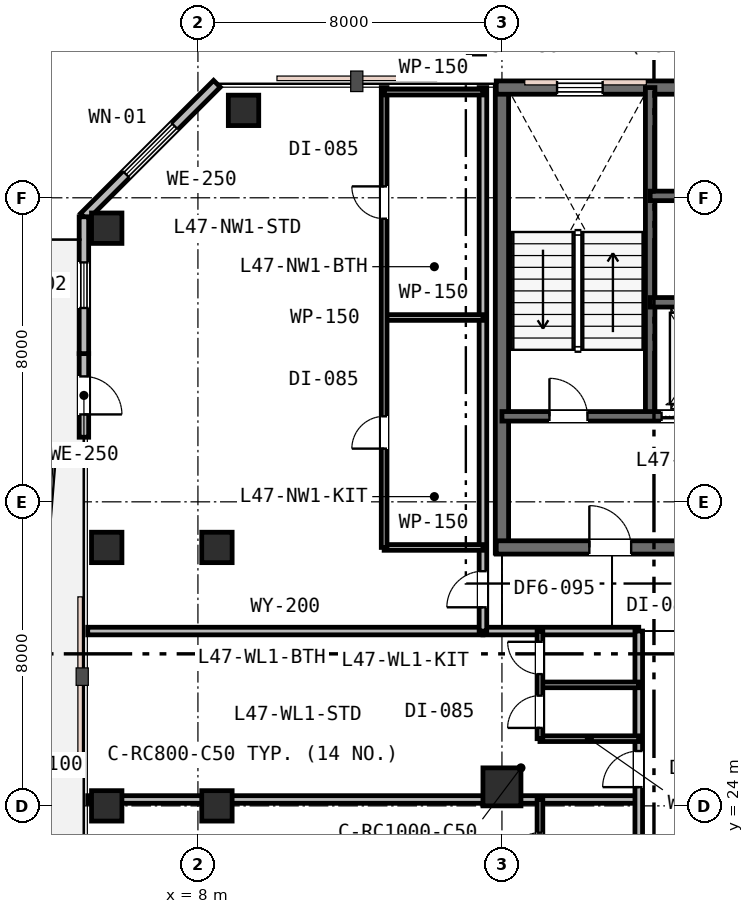
"""IFC4 building model, lengths in metres.
Left out: names, types, materials, properties, quantities, classifications, styles, units other than length and angle.
Written with IfcOpenShell. Run it as: python <this file> out.ifc"""

import sys

from ifc_helpers import new_model, si_unit, direction, frame, frame_2d, origin, origin_2d, place, context, subcontext, project, spatial, rectangle, extrude, element, fill, save


model = new_model("IFC4")
c1 = context("Model", 3, precision=1e-05, world=origin(), true_north=direction((0.0, 1.0)))
c2 = subcontext(c1, "Body", "Model", "MODEL_VIEW")
j1 = project(units=[si_unit("LENGTHUNIT", "METRE"), si_unit("PLANEANGLEUNIT", "RADIAN")], contexts=[c1])
p1 = place(None, origin())
s1 = spatial("IfcSite", under=j1, at=p1, CompositionType="ELEMENT")
p2 = place(p1, origin())
s2 = spatial("IfcBuilding", under=s1, at=p2, CompositionType="ELEMENT")
p3 = place(p2, frame((0.0, 0.0, 183.0)))
s3 = spatial("IfcBuildingStorey", under=s2, at=p3, CompositionType="ELEMENT", Elevation=183.0)
p4 = place(p3, frame((16.0, 30.65, 0.0), z_axis=(0.0, 0.0, 1.0), x_axis=(0.0, 1.0, 0.0)))
e1 = element("IfcWall", 1, at=p4, inside=s3, PredefinedType="SHEAR", context=c2, shape_type="SweptSolid", body=[
    extrude(rectangle(XDim=12.3, YDim=0.35, at=frame_2d((6.15, 0.0))), origin(), (0.0, 0.0, 1.0), 3.6),
])
p5 = place(p3, frame((15.85, 42.9, 0.0), z_axis=(0.0, 0.0, 1.0), x_axis=(1.0, 0.0, 0.0)))
e2 = element("IfcWall", 2, at=p5, inside=s3, PredefinedType="SHEAR", context=c2, shape_type="SweptSolid", body=[
    extrude(rectangle(XDim=24.3, YDim=0.35, at=frame_2d((12.15, 0.0))), origin(), (0.0, 0.0, 1.0), 3.6),
])
p6 = place(p5, frame((1.6, 0.0, 0.95)))
e3 = element("IfcOpeningElement", 3, at=p6, cuts=e2, PredefinedType="OPENING", context=c2, shape_type="SweptSolid", body=[
    extrude(rectangle(XDim=1.2, YDim=1.6, at=frame_2d((0.6, 0.8))), frame((0.0, 0.185, 0.0), z_axis=(0.0, -1.0, 0.0), x_axis=(1.0, 0.0, 0.0)), (0.0, 0.0, 1.0), 0.37),
])
p7 = place(p5, frame((16.5, 0.0, 0.95)))
e4 = element("IfcOpeningElement", 4, at=p7, cuts=e2, PredefinedType="OPENING", context=c2, shape_type="SweptSolid", body=[
    extrude(rectangle(XDim=1.2, YDim=1.6, at=frame_2d((0.6, 0.8))), frame((0.0, 0.185, 0.0), z_axis=(0.0, -1.0, 0.0), x_axis=(1.0, 0.0, 0.0)), (0.0, 0.0, 1.0), 0.37),
])
p8 = place(p5, frame((21.6, 0.0, 0.95)))
e5 = element("IfcOpeningElement", 5, at=p8, cuts=e2, PredefinedType="OPENING", context=c2, shape_type="SweptSolid", body=[
    extrude(rectangle(XDim=1.2, YDim=1.6, at=frame_2d((0.6, 0.8))), frame((0.0, 0.185, 0.0), z_axis=(0.0, -1.0, 0.0), x_axis=(1.0, 0.0, 0.0)), (0.0, 0.0, 1.0), 0.37),
])
p9 = place(p3, frame((15.85, 30.8, 0.0), z_axis=(0.0, 0.0, 1.0), x_axis=(1.0, 0.0, 0.0)))
e6 = element("IfcWall", 6, at=p9, inside=s3, PredefinedType="SHEAR", context=c2, shape_type="SweptSolid", body=[
    extrude(rectangle(XDim=11.2, YDim=0.35, at=frame_2d((5.6, 0.0))), origin(), (0.0, 0.0, 1.0), 3.6),
])
p10 = place(p9, frame((2.45, 0.0, 0.0)))
e7 = element("IfcOpeningElement", 7, at=p10, cuts=e6, PredefinedType="OPENING", context=c2, shape_type="SweptSolid", body=[
    extrude(rectangle(XDim=1.1, YDim=2.15, at=frame_2d((0.55, 1.075))), frame((0.0, 0.185, 0.0), z_axis=(0.0, -1.0, 0.0), x_axis=(1.0, 0.0, 0.0)), (0.0, 0.0, 1.0), 0.37),
])
p11 = place(p3, frame((19.9, 34.25, 0.0), z_axis=(0.0, 0.0, 1.0), x_axis=(0.0, 1.0, 0.0)))
e8 = element("IfcWall", 8, at=p11, inside=s3, PredefinedType="SHEAR", context=c2, shape_type="SweptSolid", body=[
    extrude(rectangle(XDim=8.65, YDim=0.25, at=frame_2d((4.325, 0.0))), origin(), (0.0, 0.0, 1.0), 3.6),
])
p12 = place(p3, frame((16.0, 34.25, 0.0), z_axis=(0.0, 0.0, 1.0), x_axis=(1.0, 0.0, 0.0)))
e9 = element("IfcWall", 9, at=p12, inside=s3, PredefinedType="SHEAR", context=c2, shape_type="SweptSolid", body=[
    extrude(rectangle(XDim=6.05, YDim=0.25, at=frame_2d((3.025, 0.0))), origin(), (0.0, 0.0, 1.0), 3.6),
])
p13 = place(p12, frame((1.25, 0.0, 0.0)))
e10 = element("IfcOpeningElement", 10, at=p13, cuts=e9, PredefinedType="OPENING", context=c2, shape_type="SweptSolid", body=[
    extrude(rectangle(XDim=1.0, YDim=2.15, at=frame_2d((0.5, 1.075))), frame((0.0, 0.135, 0.0), z_axis=(0.0, -1.0, 0.0), x_axis=(1.0, 0.0, 0.0)), (0.0, 0.0, 1.0), 0.27),
])
p14 = place(p12, frame((4.2, 0.0, 0.0)))
e11 = element("IfcOpeningElement", 11, at=p14, cuts=e9, PredefinedType="OPENING", context=c2, shape_type="SweptSolid", body=[
    extrude(rectangle(XDim=1.1, YDim=2.15, at=frame_2d((0.55, 1.075))), frame((0.0, 0.135, 0.0), z_axis=(0.0, -1.0, 0.0), x_axis=(1.0, 0.0, 0.0)), (0.0, 0.0, 1.0), 0.27),
])
p15 = place(p3, frame((19.9, 37.25, 0.0), z_axis=(0.0, 0.0, 1.0), x_axis=(1.0, 0.0, 0.0)))
e12 = element("IfcWall", 12, at=p15, inside=s3, PredefinedType="SHEAR", context=c2, shape_type="SweptSolid", body=[
    extrude(rectangle(XDim=16.2, YDim=0.25, at=frame_2d((8.1, 0.0))), origin(), (0.0, 0.0, 1.0), 3.6),
])
p16 = place(p15, frame((12.55, 0.0, 0.0)))
e13 = element("IfcOpeningElement", 13, at=p16, cuts=e12, PredefinedType="OPENING", context=c2, shape_type="SweptSolid", body=[
    extrude(rectangle(XDim=0.9, YDim=2.15, at=frame_2d((0.45, 1.075))), frame((0.0, 0.135, 0.0), z_axis=(0.0, -1.0, 0.0), x_axis=(1.0, 0.0, 0.0)), (0.0, 0.0, 1.0), 0.27),
])
p17 = place(p15, frame((2.5, 0.0, 0.0)))
e14 = element("IfcOpeningElement", 14, at=p17, cuts=e12, PredefinedType="OPENING", context=c2, shape_type="SweptSolid", body=[
    extrude(rectangle(XDim=1.05, YDim=2.15, at=frame_2d((0.525, 1.075))), frame((0.0, 0.135, 0.0), z_axis=(0.0, -1.0, 0.0), x_axis=(1.0, 0.0, 0.0)), (0.0, 0.0, 1.0), 0.27),
])
p18 = place(p15, frame((4.4, 0.0, 0.0)))
e15 = element("IfcOpeningElement", 15, at=p18, cuts=e12, PredefinedType="OPENING", context=c2, shape_type="SweptSolid", body=[
    extrude(rectangle(XDim=1.05, YDim=2.15, at=frame_2d((0.525, 1.075))), frame((0.0, 0.135, 0.0), z_axis=(0.0, -1.0, 0.0), x_axis=(1.0, 0.0, 0.0)), (0.0, 0.0, 1.0), 0.27),
])
p19 = place(p15, frame((6.3, 0.0, 0.0)))
e16 = element("IfcOpeningElement", 16, at=p19, cuts=e12, PredefinedType="OPENING", context=c2, shape_type="SweptSolid", body=[
    extrude(rectangle(XDim=1.05, YDim=2.15, at=frame_2d((0.525, 1.075))), frame((0.0, 0.135, 0.0), z_axis=(0.0, -1.0, 0.0), x_axis=(1.0, 0.0, 0.0)), (0.0, 0.0, 1.0), 0.27),
])
p20 = place(p3, frame((19.9, 40.05, 0.0), z_axis=(0.0, 0.0, 1.0), x_axis=(1.0, 0.0, 0.0)))
e17 = element("IfcWall", 17, at=p20, inside=s3, PredefinedType="SHEAR", context=c2, shape_type="SweptSolid", body=[
    extrude(rectangle(XDim=12.05, YDim=0.25, at=frame_2d((6.025, 0.0))), origin(), (0.0, 0.0, 1.0), 3.6),
])
p21 = place(p3, frame((8.5, 24.0, 0.0), z_axis=(0.0, 0.0, 1.0), x_axis=(1.0, 0.0, 0.0)))
e18 = element("IfcColumn", 18, at=p21, inside=s3, PredefinedType="COLUMN", context=c2, shape_type="SweptSolid", body=[
    extrude(rectangle(XDim=0.8, YDim=0.8, at=origin_2d()), origin(), (0.0, 0.0, 1.0), 3.6),
])
p22 = place(p3, frame((16.0, 24.5, 0.0), z_axis=(0.0, 0.0, 1.0), x_axis=(1.0, 0.0, 0.0)))
e19 = element("IfcColumn", 19, at=p22, inside=s3, PredefinedType="COLUMN", context=c2, shape_type="SweptSolid", body=[
    extrude(rectangle(XDim=1.0, YDim=1.0, at=origin_2d()), origin(), (0.0, 0.0, 1.0), 3.6),
])
for number, where, z_axis, x_axis in (
    (20, (5.6, 24.0, 0.0), (0.0, 0.0, 1.0), (1.0, 0.0, 0.0)),
    (21, (5.6, 30.8, 0.0), (0.0, 0.0, 1.0), (1.0, 0.0, 0.0)),
    (22, (5.6, 39.2, 0.0), (0.0, 0.0, 1.0), (1.0, 0.0, 0.0)),
    (23, (8.5, 30.8, 0.0), (0.0, 0.0, 1.0), (1.0, 0.0, 0.0)),
    (24, (9.2, 42.3, 0.0), (0.0, 0.0, 1.0), (1.0, 0.0, 0.0)),
):
    element("IfcColumn", number, at=place(p3, frame(where, z_axis=z_axis, x_axis=x_axis)), inside=s3, PredefinedType="COLUMN", context=c2, shape_type="SweptSolid", body=[
        extrude(rectangle(XDim=0.8, YDim=0.8, at=origin_2d()), origin(), (0.0, 0.0, 1.0), 3.6),
    ])
p23 = place(p3, frame((8.5, 43.0, 0.0), z_axis=(0.0, 0.0, 1.0), x_axis=(-0.707106781187, -0.707106781187, 0.0)))
e25 = element("IfcWall", 25, at=p23, inside=s3, PredefinedType="STANDARD", context=c2, shape_type="SweptSolid", body=[
    extrude(rectangle(XDim=4.95, YDim=0.25, at=frame_2d((2.475, 0.0))), origin(), (0.0, 0.0, 1.0), 3.33),
])
p24 = place(p23, frame((1.575, 0.0, 0.75)))
e26 = element("IfcOpeningElement", 26, at=p24, cuts=e25, PredefinedType="OPENING", context=c2, shape_type="SweptSolid", body=[
    extrude(rectangle(XDim=1.8, YDim=1.85, at=frame_2d((0.9, 0.925))), frame((0.0, 0.135, 0.0), z_axis=(0.0, -1.0, 0.0), x_axis=(1.0, 0.0, 0.0)), (0.0, 0.0, 1.0), 0.27),
])
p25 = place(p3, frame((5.0, 35.9, 0.0), z_axis=(0.0, 0.0, 1.0), x_axis=(0.0, -1.0, 0.0)))
e27 = element("IfcWall", 27, at=p25, inside=s3, PredefinedType="STANDARD", context=c2, shape_type="SweptSolid", body=[
    extrude(rectangle(XDim=2.2, YDim=0.25, at=frame_2d((1.1, 0.0))), origin(), (0.0, 0.0, 1.0), 3.33),
])
p26 = place(p25, frame((0.6, 0.0, 0.0)))
e28 = element("IfcOpeningElement", 28, at=p26, cuts=e27, PredefinedType="OPENING", context=c2, shape_type="SweptSolid", body=[
    extrude(rectangle(XDim=1.0, YDim=2.15, at=frame_2d((0.5, 1.075))), frame((0.0, 0.135, 0.0), z_axis=(0.0, -1.0, 0.0), x_axis=(1.0, 0.0, 0.0)), (0.0, 0.0, 1.0), 0.27),
])
p27 = place(p3, frame((5.0, 39.5, 0.0), z_axis=(0.0, 0.0, 1.0), x_axis=(0.0, -1.0, 0.0)))
e29 = element("IfcWall", 29, at=p27, inside=s3, PredefinedType="STANDARD", context=c2, shape_type="SweptSolid", body=[
    extrude(rectangle(XDim=3.6, YDim=0.25, at=frame_2d((1.8, 0.0))), origin(), (0.0, 0.0, 1.0), 3.33),
])
p28 = place(p27, frame((1.2, 0.0, 0.85)))
e30 = element("IfcOpeningElement", 30, at=p28, cuts=e29, PredefinedType="OPENING", context=c2, shape_type="SweptSolid", body=[
    extrude(rectangle(XDim=1.2, YDim=1.6, at=frame_2d((0.6, 0.8))), frame((0.0, 0.135, 0.0), z_axis=(0.0, -1.0, 0.0), x_axis=(1.0, 0.0, 0.0)), (0.0, 0.0, 1.0), 0.27),
])
p29 = place(p3, frame((5.1, 28.6, 0.0), z_axis=(0.0, 0.0, 1.0), x_axis=(1.0, 0.0, 0.0)))
e31 = element("IfcWall", 31, at=p29, inside=s3, PredefinedType="PARTITIONING", context=c2, shape_type="SweptSolid", body=[
    extrude(rectangle(XDim=10.4, YDim=0.2, at=frame_2d((5.2, 0.0))), origin(), (0.0, 0.0, 1.0), 2.92),
])
p30 = place(p3, frame((15.5, 28.6, 0.0), z_axis=(0.0, 0.0, 1.0), x_axis=(1.0, 0.0, 0.0)))
e32 = element("IfcWall", 32, at=p30, inside=s3, PredefinedType="PARTITIONING", context=c2, shape_type="SweptSolid", body=[
    extrude(rectangle(XDim=4.1, YDim=0.2, at=frame_2d((2.05, 0.0))), origin(), (0.0, 0.0, 1.0), 2.92),
])
p31 = place(p3, frame((15.5, 28.6, 0.0), z_axis=(0.0, 0.0, 1.0), x_axis=(0.0, 1.0, 0.0)))
e33 = element("IfcWall", 33, at=p31, inside=s3, PredefinedType="PARTITIONING", context=c2, shape_type="SweptSolid", body=[
    extrude(rectangle(XDim=14.3, YDim=0.2, at=frame_2d((7.15, 0.0))), origin(), (0.0, 0.0, 1.0), 2.92),
])
p32 = place(p31, frame((0.625, 0.0, 0.0)))
e34 = element("IfcOpeningElement", 34, at=p32, cuts=e33, PredefinedType="OPENING", context=c2, shape_type="SweptSolid", body=[
    extrude(rectangle(XDim=0.95, YDim=2.15, at=frame_2d((0.475, 1.075))), frame((0.0, 0.11, 0.0), z_axis=(0.0, -1.0, 0.0), x_axis=(1.0, 0.0, 0.0)), (0.0, 0.0, 1.0), 0.22),
])
p33 = place(p3, frame((12.9, 30.8, 0.0), z_axis=(0.0, 0.0, 1.0), x_axis=(1.0, 0.0, 0.0)))
e35 = element("IfcWall", 35, at=p33, inside=s3, PredefinedType="PARTITIONING", context=c2, shape_type="SweptSolid", body=[
    extrude(rectangle(XDim=2.6, YDim=0.15, at=frame_2d((1.3, 0.0))), origin(), (0.0, 0.0, 1.0), 2.92),
])
p34 = place(p3, frame((12.9, 36.85, 0.0), z_axis=(0.0, 0.0, 1.0), x_axis=(1.0, 0.0, 0.0)))
e36 = element("IfcWall", 36, at=p34, inside=s3, PredefinedType="PARTITIONING", context=c2, shape_type="SweptSolid", body=[
    extrude(rectangle(XDim=2.6, YDim=0.15, at=frame_2d((1.3, 0.0))), origin(), (0.0, 0.0, 1.0), 3.33),
])
p35 = place(p3, frame((12.9, 30.8, 0.0), z_axis=(0.0, 0.0, 1.0), x_axis=(0.0, 1.0, 0.0)))
e37 = element("IfcWall", 37, at=p35, inside=s3, PredefinedType="PARTITIONING", context=c2, shape_type="SweptSolid", body=[
    extrude(rectangle(XDim=12.1, YDim=0.15, at=frame_2d((6.05, 0.0))), origin(), (0.0, 0.0, 1.0), 2.92),
])
p36 = place(p35, frame((2.6, 0.0, 0.0)))
e38 = element("IfcOpeningElement", 38, at=p36, cuts=e37, PredefinedType="OPENING", context=c2, shape_type="SweptSolid", body=[
    extrude(rectangle(XDim=0.85, YDim=2.15, at=frame_2d((0.425, 1.075))), frame((0.0, 0.085, 0.0), z_axis=(0.0, -1.0, 0.0), x_axis=(1.0, 0.0, 0.0)), (0.0, 0.0, 1.0), 0.17),
])
p37 = place(p35, frame((8.65, 0.0, 0.0)))
e39 = element("IfcOpeningElement", 39, at=p37, cuts=e37, PredefinedType="OPENING", context=c2, shape_type="SweptSolid", body=[
    extrude(rectangle(XDim=0.85, YDim=2.15, at=frame_2d((0.425, 1.075))), frame((0.0, 0.085, 0.0), z_axis=(0.0, -1.0, 0.0), x_axis=(1.0, 0.0, 0.0)), (0.0, 0.0, 1.0), 0.17),
])
p38 = place(p3, frame((12.9, 42.78, 0.0), z_axis=(0.0, 0.0, 1.0), x_axis=(1.0, 0.0, 0.0)))
e40 = element("IfcWall", 40, at=p38, inside=s3, PredefinedType="PARTITIONING", context=c2, shape_type="SweptSolid", body=[
    extrude(rectangle(XDim=2.6, YDim=0.15, at=frame_2d((1.3, 0.0))), origin(), (0.0, 0.0, 1.0), 3.33),
])
p39 = place(p3, frame((5.1, 24.168, 0.0), z_axis=(0.0, 0.0, 1.0), x_axis=(1.0, 0.0, 0.0)))
e41 = element("IfcWall", 41, at=p39, inside=s3, PredefinedType="PARTITIONING", context=c2, shape_type="SweptSolid", body=[
    extrude(rectangle(XDim=14.5, YDim=0.2, at=frame_2d((7.25, 0.0))), origin(), (0.0, 0.0, 1.0), 2.92),
])
p40 = place(p3, frame((19.6, 17.0, 0.0), z_axis=(0.0, 0.0, 1.0), x_axis=(0.0, 1.0, 0.0)))
e42 = element("IfcWall", 42, at=p40, inside=s3, PredefinedType="PARTITIONING", context=c2, shape_type="SweptSolid", body=[
    extrude(rectangle(XDim=11.6, YDim=0.2, at=frame_2d((5.8, 0.0))), origin(), (0.0, 0.0, 1.0), 2.92),
])
p41 = place(p40, frame((7.493, 0.0, 0.0)))
e43 = element("IfcOpeningElement", 43, at=p41, cuts=e42, PredefinedType="OPENING", context=c2, shape_type="SweptSolid", body=[
    extrude(rectangle(XDim=0.95, YDim=2.15, at=frame_2d((0.475, 1.075))), frame((0.0, 0.11, 0.0), z_axis=(0.0, -1.0, 0.0), x_axis=(1.0, 0.0, 0.0)), (0.0, 0.0, 1.0), 0.22),
])
p42 = place(p40, frame((0.909, 0.0, 0.0)))
e44 = element("IfcOpeningElement", 44, at=p42, cuts=e42, PredefinedType="OPENING", context=c2, shape_type="SweptSolid", body=[
    extrude(rectangle(XDim=0.95, YDim=2.15, at=frame_2d((0.475, 1.075))), frame((0.0, 0.11, 0.0), z_axis=(0.0, -1.0, 0.0), x_axis=(1.0, 0.0, 0.0)), (0.0, 0.0, 1.0), 0.22),
])
for number, where, z_axis, x_axis in (
    (45, (17.0, 25.768, 0.0), (0.0, 0.0, 1.0), (1.0, 0.0, 0.0)),
    (46, (17.0, 27.184, 0.0), (0.0, 0.0, 1.0), (1.0, 0.0, 0.0)),
):
    element("IfcWall", number, at=place(p3, frame(where, z_axis=z_axis, x_axis=x_axis)), inside=s3, PredefinedType="PARTITIONING", context=c2, shape_type="SweptSolid", body=[
        extrude(rectangle(XDim=2.6, YDim=0.15, at=frame_2d((1.3, 0.0))), origin(), (0.0, 0.0, 1.0), 3.07),
    ])
p43 = place(p3, frame((17.0, 25.768, 0.0), z_axis=(0.0, 0.0, 1.0), x_axis=(0.0, 1.0, 0.0)))
e47 = element("IfcWall", 47, at=p43, inside=s3, PredefinedType="PARTITIONING", context=c2, shape_type="SweptSolid", body=[
    extrude(rectangle(XDim=2.832, YDim=0.15, at=frame_2d((1.416, 0.0))), origin(), (0.0, 0.0, 1.0), 3.33),
])
p44 = place(p43, frame((0.283, 0.0, 0.0)))
e48 = element("IfcOpeningElement", 48, at=p44, cuts=e47, PredefinedType="OPENING", context=c2, shape_type="SweptSolid", body=[
    extrude(rectangle(XDim=0.85, YDim=2.15, at=frame_2d((0.425, 1.075))), frame((0.0, 0.085, 0.0), z_axis=(0.0, -1.0, 0.0), x_axis=(1.0, 0.0, 0.0)), (0.0, 0.0, 1.0), 0.17),
])
p45 = place(p43, frame((1.699, 0.0, 0.0)))
e49 = element("IfcOpeningElement", 49, at=p45, cuts=e47, PredefinedType="OPENING", context=c2, shape_type="SweptSolid", body=[
    extrude(rectangle(XDim=0.85, YDim=2.15, at=frame_2d((0.425, 1.075))), frame((0.0, 0.085, 0.0), z_axis=(0.0, -1.0, 0.0), x_axis=(1.0, 0.0, 0.0)), (0.0, 0.0, 1.0), 0.17),
])
p46 = place(p3, frame((17.0, 19.768, 0.0), z_axis=(0.0, 0.0, 1.0), x_axis=(0.0, 1.0, 0.0)))
e50 = element("IfcWall", 50, at=p46, inside=s3, PredefinedType="PARTITIONING", context=c2, shape_type="SweptSolid", body=[
    extrude(rectangle(XDim=4.4, YDim=0.15, at=frame_2d((2.2, 0.0))), origin(), (0.0, 0.0, 1.0), 2.92),
])
p47 = place(p46, frame((0.675, 0.0, 0.0)))
e51 = element("IfcOpeningElement", 51, at=p47, cuts=e50, PredefinedType="OPENING", context=c2, shape_type="SweptSolid", body=[
    extrude(rectangle(XDim=0.85, YDim=2.15, at=frame_2d((0.425, 1.075))), frame((0.0, 0.085, 0.0), z_axis=(0.0, -1.0, 0.0), x_axis=(1.0, 0.0, 0.0)), (0.0, 0.0, 1.0), 0.17),
])
p48 = place(p46, frame((2.677, 0.0, 0.0)))
e52 = element("IfcOpeningElement", 52, at=p48, cuts=e50, PredefinedType="OPENING", context=c2, shape_type="SweptSolid", body=[
    extrude(rectangle(XDim=0.85, YDim=2.15, at=frame_2d((0.425, 1.075))), frame((0.0, 0.085, 0.0), z_axis=(0.0, -1.0, 0.0), x_axis=(1.0, 0.0, 0.0)), (0.0, 0.0, 1.0), 0.17),
])
p49 = place(p6, origin())
e53 = element("IfcWindow", 53, at=p49, inside=s3, PartitioningType="SINGLE_PANEL", PredefinedType="WINDOW", context=c2, shape_type="SweptSolid", body=[
    extrude(rectangle(XDim=1.2, YDim=1.6, at=frame_2d((0.6, 0.8))), frame((0.0, 0.03, 0.0), z_axis=(0.0, -1.0, 0.0), x_axis=(1.0, 0.0, 0.0)), (0.0, 0.0, 1.0), 0.06),
])
fill(e3, e53)
p50 = place(p24, origin())
e54 = element("IfcWindow", 54, at=p50, inside=s3, PartitioningType="SINGLE_PANEL", PredefinedType="WINDOW", context=c2, shape_type="SweptSolid", body=[
    extrude(rectangle(XDim=1.8, YDim=1.85, at=frame_2d((0.9, 0.925))), frame((0.0, 0.03, 0.0), z_axis=(0.0, -1.0, 0.0), x_axis=(1.0, 0.0, 0.0)), (0.0, 0.0, 1.0), 0.06),
])
fill(e26, e54)
p51 = place(p26, origin())
e55 = element("IfcDoor", 55, at=p51, inside=s3, OperationType="SINGLE_SWING_RIGHT", PredefinedType="DOOR", context=c2, shape_type="SweptSolid", body=[
    extrude(rectangle(XDim=1.0, YDim=2.15, at=frame_2d((0.5, 1.075))), frame((0.0, 0.025, 0.0), z_axis=(0.0, -1.0, 0.0), x_axis=(1.0, 0.0, 0.0)), (0.0, 0.0, 1.0), 0.05),
])
fill(e28, e55)
p52 = place(p28, origin())
e56 = element("IfcWindow", 56, at=p52, inside=s3, PartitioningType="SINGLE_PANEL", PredefinedType="WINDOW", context=c2, shape_type="SweptSolid", body=[
    extrude(rectangle(XDim=1.2, YDim=1.6, at=frame_2d((0.6, 0.8))), frame((0.0, 0.03, 0.0), z_axis=(0.0, -1.0, 0.0), x_axis=(1.0, 0.0, 0.0)), (0.0, 0.0, 1.0), 0.06),
])
fill(e30, e56)
p53 = place(p13, origin())
e57 = element("IfcDoor", 57, at=p53, inside=s3, OperationType="SINGLE_SWING_LEFT", PredefinedType="DOOR", context=c2, shape_type="SweptSolid", body=[
    extrude(rectangle(XDim=1.0, YDim=2.15, at=frame_2d((0.5, 1.075))), frame((0.0, 0.025, 0.0), z_axis=(0.0, -1.0, 0.0), x_axis=(1.0, 0.0, 0.0)), (0.0, 0.0, 1.0), 0.05),
])
fill(e10, e57)
p54 = place(p10, origin())
e58 = element("IfcDoor", 58, at=p54, inside=s3, OperationType="SINGLE_SWING_LEFT", PredefinedType="DOOR", context=c2, shape_type="SweptSolid", body=[
    extrude(rectangle(XDim=1.1, YDim=2.15, at=frame_2d((0.55, 1.075))), frame((0.0, 0.025, 0.0), z_axis=(0.0, -1.0, 0.0), x_axis=(1.0, 0.0, 0.0)), (0.0, 0.0, 1.0), 0.05),
])
fill(e7, e58)
p55 = place(p32, origin())
e59 = element("IfcDoor", 59, at=p55, inside=s3, OperationType="SINGLE_SWING_LEFT", PredefinedType="DOOR", context=c2, shape_type="SweptSolid", body=[
    extrude(rectangle(XDim=0.95, YDim=2.15, at=frame_2d((0.475, 1.075))), frame((0.0, 0.025, 0.0), z_axis=(0.0, -1.0, 0.0), x_axis=(1.0, 0.0, 0.0)), (0.0, 0.0, 1.0), 0.05),
])
fill(e34, e59)
p56 = place(p36, origin())
e60 = element("IfcDoor", 60, at=p56, inside=s3, OperationType="SINGLE_SWING_LEFT", PredefinedType="DOOR", context=c2, shape_type="SweptSolid", body=[
    extrude(rectangle(XDim=0.85, YDim=2.15, at=frame_2d((0.425, 1.075))), frame((0.0, 0.025, 0.0), z_axis=(0.0, -1.0, 0.0), x_axis=(1.0, 0.0, 0.0)), (0.0, 0.0, 1.0), 0.05),
])
fill(e38, e60)
p57 = place(p37, origin())
e61 = element("IfcDoor", 61, at=p57, inside=s3, OperationType="SINGLE_SWING_RIGHT", PredefinedType="DOOR", context=c2, shape_type="SweptSolid", body=[
    extrude(rectangle(XDim=0.85, YDim=2.15, at=frame_2d((0.425, 1.075))), frame((0.0, 0.025, 0.0), z_axis=(0.0, -1.0, 0.0), x_axis=(1.0, 0.0, 0.0)), (0.0, 0.0, 1.0), 0.05),
])
fill(e39, e61)
p58 = place(p41, origin())
e62 = element("IfcDoor", 62, at=p58, inside=s3, OperationType="SINGLE_SWING_LEFT", PredefinedType="DOOR", context=c2, shape_type="SweptSolid", body=[
    extrude(rectangle(XDim=0.95, YDim=2.15, at=frame_2d((0.475, 1.075))), frame((0.0, 0.025, 0.0), z_axis=(0.0, -1.0, 0.0), x_axis=(1.0, 0.0, 0.0)), (0.0, 0.0, 1.0), 0.05),
])
fill(e43, e62)
p59 = place(p44, origin())
e63 = element("IfcDoor", 63, at=p59, inside=s3, OperationType="SINGLE_SWING_LEFT", PredefinedType="DOOR", context=c2, shape_type="SweptSolid", body=[
    extrude(rectangle(XDim=0.85, YDim=2.15, at=frame_2d((0.425, 1.075))), frame((0.0, 0.025, 0.0), z_axis=(0.0, -1.0, 0.0), x_axis=(1.0, 0.0, 0.0)), (0.0, 0.0, 1.0), 0.05),
])
fill(e48, e63)
p60 = place(p45, origin())
e64 = element("IfcDoor", 64, at=p60, inside=s3, OperationType="SINGLE_SWING_RIGHT", PredefinedType="DOOR", context=c2, shape_type="SweptSolid", body=[
    extrude(rectangle(XDim=0.85, YDim=2.15, at=frame_2d((0.425, 1.075))), frame((0.0, 0.025, 0.0), z_axis=(0.0, -1.0, 0.0), x_axis=(1.0, 0.0, 0.0)), (0.0, 0.0, 1.0), 0.05),
])
fill(e49, e64)
p61 = place(p48, origin())
e65 = element("IfcDoor", 65, at=p61, inside=s3, OperationType="SINGLE_SWING_LEFT", PredefinedType="DOOR", context=c2, shape_type="SweptSolid", body=[
    extrude(rectangle(XDim=0.85, YDim=2.15, at=frame_2d((0.425, 1.075))), frame((0.0, 0.025, 0.0), z_axis=(0.0, -1.0, 0.0), x_axis=(1.0, 0.0, 0.0)), (0.0, 0.0, 1.0), 0.05),
])
fill(e52, e65)
p62 = place(p14, origin())
e66 = element("IfcDoor", 66, at=p62, inside=s3, OperationType="DOUBLE_DOOR_SLIDING", PredefinedType="DOOR", context=c2, shape_type="SweptSolid", body=[
    extrude(rectangle(XDim=1.1, YDim=2.15, at=frame_2d((0.55, 1.075))), frame((0.0, 0.025, 0.0), z_axis=(0.0, -1.0, 0.0), x_axis=(1.0, 0.0, 0.0)), (0.0, 0.0, 1.0), 0.05),
])
fill(e11, e66)
save(model, sys.argv[1])
